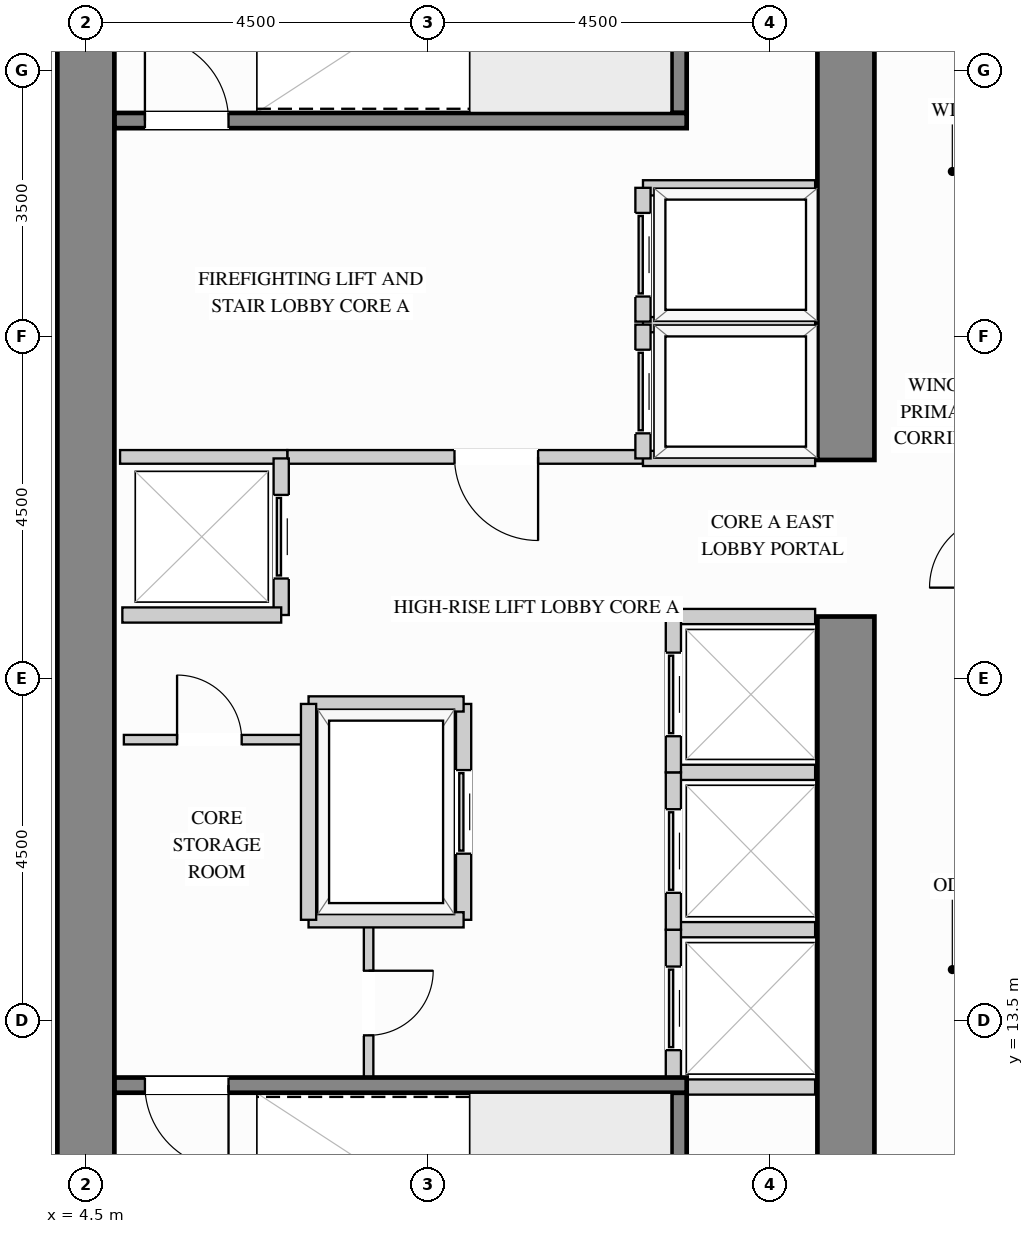
"""IFC4 building model, lengths in metres.
Left out: names, types, materials, properties, quantities, classifications, styles, units other than length and angle.
Written with IfcOpenShell. Run it as: python <this file> out.ifc"""

import sys

from ifc_helpers import new_model, si_unit, direction, frame, frame_2d, origin, place, context, subcontext, project, spatial, rectangle, extrude, source, transform, mapped, element, fill, save


model = new_model("IFC4")
c1 = context("Model", 3, precision=1e-05, world=origin(), true_north=direction((0.0, 1.0)))
c2 = subcontext(c1, "Body", "Model", "MODEL_VIEW")
j1 = project(units=[si_unit("LENGTHUNIT", "METRE"), si_unit("PLANEANGLEUNIT", "RADIAN")], contexts=[c1])
p1 = place(None, origin())
s1 = spatial("IfcSite", under=j1, at=p1, CompositionType="ELEMENT")
p2 = place(p1, origin())
s2 = spatial("IfcBuilding", under=s1, at=p2, CompositionType="ELEMENT")
p3 = place(p2, frame((0.0, 0.0, 117.0)))
s3 = spatial("IfcBuildingStorey", under=s2, at=p3, CompositionType="ELEMENT", Elevation=117.0)
m1 = source(origin(), c2, "Body", "SweptSolid", [
    extrude(rectangle(XDim=9.945, YDim=0.75, at=frame_2d((4.973, 0.0))), origin(), (0.0, 0.0, 1.0), 3.38),
])
p4 = place(p3, frame((14.5, 8.875, 0.0), z_axis=(0.0, 0.0, 1.0), x_axis=(0.0, 1.0, 0.0)))
e1 = element("IfcWall", 1, at=p4, inside=s3, PredefinedType="SHEAR", context=c2, shape_type="MappedRepresentation", body=[
    mapped(m1, transform((0.0, 0.0, 0.0), x_axis=(1.0, 0.0, 0.0), y_axis=(0.0, 1.0, 0.0), z_axis=(0.0, 0.0, 1.0))),
])
m2 = source(origin(), c2, "Body", "SweptSolid", [
    extrude(rectangle(XDim=8.245, YDim=0.75, at=frame_2d((4.123, 0.0))), origin(), (0.0, 0.0, 1.0), 3.38),
])
p5 = place(p3, frame((14.5, 20.88, 0.0), z_axis=(0.0, 0.0, 1.0), x_axis=(0.0, 1.0, 0.0)))
e2 = element("IfcWall", 2, at=p5, inside=s3, PredefinedType="SHEAR", context=c2, shape_type="MappedRepresentation", body=[
    mapped(m2, transform((0.0, 0.0, 0.0), x_axis=(1.0, 0.0, 0.0), y_axis=(0.0, 1.0, 0.0), z_axis=(0.0, 0.0, 1.0))),
])
m3 = source(origin(), c2, "Body", "SweptSolid", [
    extrude(rectangle(XDim=20.25, YDim=0.75, at=frame_2d((10.125, 0.0))), origin(), (0.0, 0.0, 1.0), 3.38),
])
p6 = place(p3, frame((4.5, 8.875, 0.0), z_axis=(0.0, 0.0, 1.0), x_axis=(0.0, 1.0, 0.0)))
e3 = element("IfcWall", 3, at=p6, inside=s3, PredefinedType="SHEAR", context=c2, shape_type="MappedRepresentation", body=[
    mapped(m3, transform((0.0, 0.0, 0.0), x_axis=(1.0, 0.0, 0.0), y_axis=(0.0, 1.0, 0.0), z_axis=(0.0, 0.0, 1.0))),
])
p7 = place(p3, frame((7.15, 20.92, 0.0), z_axis=(0.0, 0.0, 1.0), x_axis=(1.0, 0.0, 0.0)))
e4 = element("IfcWall", 4, at=p7, inside=s3, PredefinedType="PARTITIONING", context=c2, shape_type="SweptSolid", body=[
    extrude(rectangle(XDim=4.68, YDim=0.18, at=frame_2d((2.34, 0.0))), origin(), (0.0, 0.0, 1.0), 3.365),
])
p8 = place(p7, frame((2.2, 0.0, 0.0)))
e5 = element("IfcOpeningElement", 5, at=p8, cuts=e4, PredefinedType="OPENING", context=c2, shape_type="SweptSolid", body=[
    extrude(rectangle(XDim=1.1, YDim=2.15, at=frame_2d((0.55, 1.075))), frame((0.0, 0.1, 0.0), z_axis=(0.0, -1.0, 0.0), x_axis=(1.0, 0.0, 0.0)), (0.0, 0.0, 1.0), 0.2),
])
m4 = source(origin(), c2, "Body", "SweptSolid", [
    extrude(rectangle(XDim=2.2, YDim=0.18, at=frame_2d((1.1, 0.0))), origin(), (0.0, 0.0, 1.0), 3.365),
])
p9 = place(p3, frame((4.95, 20.92, 0.0), z_axis=(0.0, 0.0, 1.0), x_axis=(1.0, 0.0, 0.0)))
e6 = element("IfcWall", 6, at=p9, inside=s3, PredefinedType="PARTITIONING", context=c2, shape_type="MappedRepresentation", body=[
    mapped(m4, transform((0.0, 0.0, 0.0), x_axis=(1.0, 0.0, 0.0), y_axis=(0.0, 1.0, 0.0), z_axis=(0.0, 0.0, 1.0))),
])
p10 = place(p3, frame((8.22, 12.75, 0.0), z_axis=(0.0, 0.0, 1.0), x_axis=(0.0, 1.0, 0.0)))
e7 = element("IfcWall", 7, at=p10, inside=s3, PredefinedType="PARTITIONING", context=c2, shape_type="SweptSolid", body=[
    extrude(rectangle(XDim=2.07, YDim=0.125, at=frame_2d((1.035, 0.0))), origin(), (0.0, 0.0, 1.0), 3.365),
])
p11 = place(p10, frame((0.56, 0.0, 0.0)))
e8 = element("IfcOpeningElement", 8, at=p11, cuts=e7, PredefinedType="OPENING", context=c2, shape_type="SweptSolid", body=[
    extrude(rectangle(XDim=0.85, YDim=2.1, at=frame_2d((0.425, 1.05))), frame((0.0, 0.073, 0.0), z_axis=(0.0, -1.0, 0.0), x_axis=(1.0, 0.0, 0.0)), (0.0, 0.0, 1.0), 0.145),
])
p12 = place(p3, frame((5.0, 17.2, 0.0), z_axis=(0.0, 0.0, 1.0), x_axis=(1.0, 0.0, 0.0)))
e9 = element("IfcWall", 9, at=p12, inside=s3, PredefinedType="PARTITIONING", context=c2, shape_type="SweptSolid", body=[
    extrude(rectangle(XDim=2.4, YDim=0.125, at=frame_2d((1.2, 0.0))), origin(), (0.0, 0.0, 1.0), 3.365),
])
p13 = place(p12, frame((0.7, 0.0, 0.0)))
e10 = element("IfcOpeningElement", 10, at=p13, cuts=e9, PredefinedType="OPENING", context=c2, shape_type="SweptSolid", body=[
    extrude(rectangle(XDim=0.85, YDim=2.1, at=frame_2d((0.425, 1.05))), frame((0.0, 0.073, 0.0), z_axis=(0.0, -1.0, 0.0), x_axis=(1.0, 0.0, 0.0)), (0.0, 0.0, 1.0), 0.145),
])
m5 = source(origin(), c2, "Body", "SweptSolid", [
    extrude(rectangle(XDim=2.265, YDim=0.2, at=frame_2d((1.132, 0.0))), origin(), (0.0, 0.0, 1.0), 3.365),
])
for number, where, z_axis, x_axis in (
    (11, (11.83, 22.66, 0.0), (0.0, 0.0, 1.0), (1.0, 0.0, 0.0)),
    (12, (11.83, 20.9, 0.0), (0.0, 0.0, 1.0), (1.0, 0.0, 0.0)),
):
    element("IfcWall", number, at=place(p3, frame(where, z_axis=z_axis, x_axis=x_axis)), inside=s3, PredefinedType="PARTITIONING", context=c2, shape_type="MappedRepresentation", body=[
        mapped(m5, transform((0.0, 0.0, 0.0), x_axis=(1.0, 0.0, 0.0), y_axis=(0.0, 1.0, 0.0), z_axis=(0.0, 0.0, 1.0))),
    ])
p14 = place(p3, frame((11.83, 20.9, 0.0), z_axis=(0.0, 0.0, 1.0), x_axis=(0.0, 1.0, 0.0)))
e13 = element("IfcWall", 13, at=p14, inside=s3, PredefinedType="PARTITIONING", context=c2, shape_type="SweptSolid", body=[
    extrude(rectangle(XDim=1.76, YDim=0.2, at=frame_2d((0.88, 0.0))), origin(), (0.0, 0.0, 1.0), 3.365),
])
p15 = place(p14, frame((0.33, 0.0, 0.0)))
e14 = element("IfcOpeningElement", 14, at=p15, cuts=e13, PredefinedType="OPENING", context=c2, shape_type="SweptSolid", body=[
    extrude(rectangle(XDim=1.1, YDim=2.2, at=frame_2d((0.55, 1.1))), frame((0.0, 0.11, 0.0), z_axis=(0.0, -1.0, 0.0), x_axis=(1.0, 0.0, 0.0)), (0.0, 0.0, 1.0), 0.22),
])
p16 = place(p3, frame((11.83, 24.46, 0.0), z_axis=(0.0, 0.0, 1.0), x_axis=(1.0, 0.0, 0.0)))
e15 = element("IfcWall", 15, at=p16, inside=s3, PredefinedType="PARTITIONING", context=c2, shape_type="MappedRepresentation", body=[
    mapped(m5, transform((0.0, 0.0, 0.0), x_axis=(1.0, 0.0, 0.0), y_axis=(0.0, 1.0, 0.0), z_axis=(0.0, 0.0, 1.0))),
])
p17 = place(p3, frame((11.83, 22.7, 0.0), z_axis=(0.0, 0.0, 1.0), x_axis=(0.0, 1.0, 0.0)))
e16 = element("IfcWall", 16, at=p17, inside=s3, PredefinedType="PARTITIONING", context=c2, shape_type="SweptSolid", body=[
    extrude(rectangle(XDim=1.76, YDim=0.2, at=frame_2d((0.88, 0.0))), origin(), (0.0, 0.0, 1.0), 3.365),
])
p18 = place(p17, frame((0.33, 0.0, 0.0)))
e17 = element("IfcOpeningElement", 17, at=p18, cuts=e16, PredefinedType="OPENING", context=c2, shape_type="SweptSolid", body=[
    extrude(rectangle(XDim=1.1, YDim=2.2, at=frame_2d((0.55, 1.1))), frame((0.0, 0.11, 0.0), z_axis=(0.0, -1.0, 0.0), x_axis=(1.0, 0.0, 0.0)), (0.0, 0.0, 1.0), 0.22),
])
m6 = source(origin(), c2, "Body", "SweptSolid", [
    extrude(rectangle(XDim=1.865, YDim=0.2, at=frame_2d((0.933, 0.0))), origin(), (0.0, 0.0, 1.0), 3.365),
])
for number, where, z_axis, x_axis in (
    (18, (12.23, 14.7, 0.0), (0.0, 0.0, 1.0), (1.0, 0.0, 0.0)),
    (19, (12.23, 12.63, 0.0), (0.0, 0.0, 1.0), (1.0, 0.0, 0.0)),
):
    element("IfcWall", number, at=place(p3, frame(where, z_axis=z_axis, x_axis=x_axis)), inside=s3, PredefinedType="PARTITIONING", context=c2, shape_type="MappedRepresentation", body=[
        mapped(m6, transform((0.0, 0.0, 0.0), x_axis=(1.0, 0.0, 0.0), y_axis=(0.0, 1.0, 0.0), z_axis=(0.0, 0.0, 1.0))),
    ])
p19 = place(p3, frame((12.23, 12.63, 0.0), z_axis=(0.0, 0.0, 1.0), x_axis=(0.0, 1.0, 0.0)))
e20 = element("IfcWall", 20, at=p19, inside=s3, PredefinedType="PARTITIONING", context=c2, shape_type="SweptSolid", body=[
    extrude(rectangle(XDim=2.07, YDim=0.2, at=frame_2d((1.035, 0.0))), origin(), (0.0, 0.0, 1.0), 3.365),
])
p20 = place(p19, frame((0.485, 0.0, 0.0)))
e21 = element("IfcOpeningElement", 21, at=p20, cuts=e20, PredefinedType="OPENING", context=c2, shape_type="SweptSolid", body=[
    extrude(rectangle(XDim=1.1, YDim=2.2, at=frame_2d((0.55, 1.1))), frame((0.0, 0.11, 0.0), z_axis=(0.0, -1.0, 0.0), x_axis=(1.0, 0.0, 0.0)), (0.0, 0.0, 1.0), 0.22),
])
p21 = place(p3, frame((12.23, 16.77, 0.0), z_axis=(0.0, 0.0, 1.0), x_axis=(1.0, 0.0, 0.0)))
e22 = element("IfcWall", 22, at=p21, inside=s3, PredefinedType="PARTITIONING", context=c2, shape_type="MappedRepresentation", body=[
    mapped(m6, transform((0.0, 0.0, 0.0), x_axis=(1.0, 0.0, 0.0), y_axis=(0.0, 1.0, 0.0), z_axis=(0.0, 0.0, 1.0))),
])
p22 = place(p3, frame((12.23, 14.7, 0.0), z_axis=(0.0, 0.0, 1.0), x_axis=(0.0, 1.0, 0.0)))
e23 = element("IfcWall", 23, at=p22, inside=s3, PredefinedType="PARTITIONING", context=c2, shape_type="SweptSolid", body=[
    extrude(rectangle(XDim=2.07, YDim=0.2, at=frame_2d((1.035, 0.0))), origin(), (0.0, 0.0, 1.0), 3.365),
])
p23 = place(p22, frame((0.485, 0.0, 0.0)))
e24 = element("IfcOpeningElement", 24, at=p23, cuts=e23, PredefinedType="OPENING", context=c2, shape_type="SweptSolid", body=[
    extrude(rectangle(XDim=1.1, YDim=2.2, at=frame_2d((0.55, 1.1))), frame((0.0, 0.11, 0.0), z_axis=(0.0, -1.0, 0.0), x_axis=(1.0, 0.0, 0.0)), (0.0, 0.0, 1.0), 0.22),
])
p24 = place(p3, frame((12.23, 18.82, 0.0), z_axis=(0.0, 0.0, 1.0), x_axis=(1.0, 0.0, 0.0)))
e25 = element("IfcWall", 25, at=p24, inside=s3, PredefinedType="PARTITIONING", context=c2, shape_type="MappedRepresentation", body=[
    mapped(m6, transform((0.0, 0.0, 0.0), x_axis=(1.0, 0.0, 0.0), y_axis=(0.0, 1.0, 0.0), z_axis=(0.0, 0.0, 1.0))),
])
p25 = place(p3, frame((12.23, 16.77, 0.0), z_axis=(0.0, 0.0, 1.0), x_axis=(0.0, 1.0, 0.0)))
e26 = element("IfcWall", 26, at=p25, inside=s3, PredefinedType="PARTITIONING", context=c2, shape_type="SweptSolid", body=[
    extrude(rectangle(XDim=2.05, YDim=0.2, at=frame_2d((1.025, 0.0))), origin(), (0.0, 0.0, 1.0), 3.365),
])
p26 = place(p25, frame((0.475, 0.0, 0.0)))
e27 = element("IfcOpeningElement", 27, at=p26, cuts=e26, PredefinedType="OPENING", context=c2, shape_type="SweptSolid", body=[
    extrude(rectangle(XDim=1.1, YDim=2.2, at=frame_2d((0.55, 1.1))), frame((0.0, 0.11, 0.0), z_axis=(0.0, -1.0, 0.0), x_axis=(1.0, 0.0, 0.0)), (0.0, 0.0, 1.0), 0.22),
])
p27 = place(p3, frame((7.07, 18.84, 0.0), z_axis=(0.0, 0.0, 1.0), x_axis=(0.0, 1.0, 0.0)))
e28 = element("IfcWall", 28, at=p27, inside=s3, PredefinedType="PARTITIONING", context=c2, shape_type="SweptSolid", body=[
    extrude(rectangle(XDim=2.06, YDim=0.2, at=frame_2d((1.03, 0.0))), origin(), (0.0, 0.0, 1.0), 3.365),
])
p28 = place(p27, frame((0.48, 0.0, 0.0)))
e29 = element("IfcOpeningElement", 29, at=p28, cuts=e28, PredefinedType="OPENING", context=c2, shape_type="SweptSolid", body=[
    extrude(rectangle(XDim=1.1, YDim=2.2, at=frame_2d((0.55, 1.1))), frame((0.0, 0.11, 0.0), z_axis=(0.0, -1.0, 0.0), x_axis=(1.0, 0.0, 0.0)), (0.0, 0.0, 1.0), 0.22),
])
m7 = source(origin(), c2, "Body", "SweptSolid", [
    extrude(rectangle(XDim=2.09, YDim=0.2, at=frame_2d((1.045, 0.0))), origin(), (0.0, 0.0, 1.0), 3.365),
])
p29 = place(p3, frame((4.98, 18.84, 0.0), z_axis=(0.0, 0.0, 1.0), x_axis=(1.0, 0.0, 0.0)))
e30 = element("IfcWall", 30, at=p29, inside=s3, PredefinedType="PARTITIONING", context=c2, shape_type="MappedRepresentation", body=[
    mapped(m7, transform((0.0, 0.0, 0.0), x_axis=(1.0, 0.0, 0.0), y_axis=(0.0, 1.0, 0.0), z_axis=(0.0, 0.0, 1.0))),
])
p30 = place(p3, frame((9.47, 14.83, 0.0), z_axis=(0.0, 0.0, 1.0), x_axis=(0.0, 1.0, 0.0)))
e31 = element("IfcWall", 31, at=p30, inside=s3, PredefinedType="PARTITIONING", context=c2, shape_type="SweptSolid", body=[
    extrude(rectangle(XDim=2.84, YDim=0.2, at=frame_2d((1.42, 0.0))), origin(), (0.0, 0.0, 1.0), 3.365),
])
p31 = place(p30, frame((0.87, 0.0, 0.0)))
e32 = element("IfcOpeningElement", 32, at=p31, cuts=e31, PredefinedType="OPENING", context=c2, shape_type="SweptSolid", body=[
    extrude(rectangle(XDim=1.1, YDim=2.2, at=frame_2d((0.55, 1.1))), frame((0.0, 0.11, 0.0), z_axis=(0.0, -1.0, 0.0), x_axis=(1.0, 0.0, 0.0)), (0.0, 0.0, 1.0), 0.22),
])
m8 = source(origin(), c2, "Body", "SweptSolid", [
    extrude(rectangle(XDim=2.04, YDim=0.2, at=frame_2d((1.02, 0.0))), origin(), (0.0, 0.0, 1.0), 3.365),
])
for number, where, z_axis, x_axis in (
    (33, (7.43, 17.67, 0.0), (0.0, 0.0, 1.0), (1.0, 0.0, 0.0)),
    (34, (7.43, 14.83, 0.0), (0.0, 0.0, 1.0), (1.0, 0.0, 0.0)),
):
    element("IfcWall", number, at=place(p3, frame(where, z_axis=z_axis, x_axis=x_axis)), inside=s3, PredefinedType="PARTITIONING", context=c2, shape_type="MappedRepresentation", body=[
        mapped(m8, transform((0.0, 0.0, 0.0), x_axis=(1.0, 0.0, 0.0), y_axis=(0.0, 1.0, 0.0), z_axis=(0.0, 0.0, 1.0))),
    ])
m9 = source(origin(), c2, "Body", "SweptSolid", [
    extrude(rectangle(XDim=2.84, YDim=0.2, at=frame_2d((1.42, 0.0))), origin(), (0.0, 0.0, 1.0), 3.365),
])
p32 = place(p3, frame((7.43, 14.83, 0.0), z_axis=(0.0, 0.0, 1.0), x_axis=(0.0, 1.0, 0.0)))
e35 = element("IfcWall", 35, at=p32, inside=s3, PredefinedType="PARTITIONING", context=c2, shape_type="MappedRepresentation", body=[
    mapped(m9, transform((0.0, 0.0, 0.0), x_axis=(1.0, 0.0, 0.0), y_axis=(0.0, 1.0, 0.0), z_axis=(0.0, 0.0, 1.0))),
])
m10 = source(origin(), c2, "Body", "SweptSolid", [
    extrude(rectangle(XDim=3.678, YDim=0.2, at=frame_2d((1.839, 0.0))), origin(), (0.0, 0.0, 1.0), 3.38),
])
p33 = place(p3, frame((12.305, 8.877, 0.0), z_axis=(0.0, 0.0, 1.0), x_axis=(0.0, 1.0, 0.0)))
e36 = element("IfcWall", 36, at=p33, inside=s3, PredefinedType="SHEAR", context=c2, shape_type="MappedRepresentation", body=[
    mapped(m10, transform((0.0, 0.0, 0.0), x_axis=(1.0, 0.0, 0.0), y_axis=(0.0, 1.0, 0.0), z_axis=(0.0, 0.0, 1.0))),
])
p34 = place(p3, frame((4.877, 12.655, 0.0), z_axis=(0.0, 0.0, 1.0), x_axis=(1.0, 0.0, 0.0)))
e37 = element("IfcWall", 37, at=p34, inside=s3, PredefinedType="SHEAR", context=c2, shape_type="SweptSolid", body=[
    extrude(rectangle(XDim=7.528, YDim=0.2, at=frame_2d((3.764, 0.0))), origin(), (0.0, 0.0, 1.0), 3.38),
])
p35 = place(p34, frame((0.4, 0.0, 0.0)))
e38 = element("IfcOpeningElement", 38, at=p35, cuts=e37, PredefinedType="OPENING", context=c2, shape_type="SweptSolid", body=[
    extrude(rectangle(XDim=1.1, YDim=2.15, at=frame_2d((0.55, 1.075))), frame((0.0, 0.11, 0.0), z_axis=(0.0, -1.0, 0.0), x_axis=(1.0, 0.0, 0.0)), (0.0, 0.0, 1.0), 0.22),
])
p36 = place(p3, frame((12.305, 25.445, 0.0), z_axis=(0.0, 0.0, 1.0), x_axis=(0.0, 1.0, 0.0)))
e39 = element("IfcWall", 39, at=p36, inside=s3, PredefinedType="SHEAR", context=c2, shape_type="MappedRepresentation", body=[
    mapped(m10, transform((0.0, 0.0, 0.0), x_axis=(1.0, 0.0, 0.0), y_axis=(0.0, 1.0, 0.0), z_axis=(0.0, 0.0, 1.0))),
])
p37 = place(p3, frame((4.877, 25.345, 0.0), z_axis=(0.0, 0.0, 1.0), x_axis=(1.0, 0.0, 0.0)))
e40 = element("IfcWall", 40, at=p37, inside=s3, PredefinedType="SHEAR", context=c2, shape_type="SweptSolid", body=[
    extrude(rectangle(XDim=7.528, YDim=0.2, at=frame_2d((3.764, 0.0))), origin(), (0.0, 0.0, 1.0), 3.38),
])
p38 = place(p37, frame((0.4, 0.0, 0.0)))
e41 = element("IfcOpeningElement", 41, at=p38, cuts=e40, PredefinedType="OPENING", context=c2, shape_type="SweptSolid", body=[
    extrude(rectangle(XDim=1.1, YDim=2.15, at=frame_2d((0.55, 1.075))), frame((0.0, 0.11, 0.0), z_axis=(0.0, -1.0, 0.0), x_axis=(1.0, 0.0, 0.0)), (0.0, 0.0, 1.0), 0.22),
])
m11 = source(origin(), c2, "Body", "SweptSolid", [
    extrude(rectangle(XDim=1.1, YDim=2.15, at=frame_2d((0.55, 1.075))), frame((0.0, 0.025, 0.0), z_axis=(0.0, -1.0, 0.0), x_axis=(1.0, 0.0, 0.0)), (0.0, 0.0, 1.0), 0.05),
])
p39 = place(p8, origin())
e42 = element("IfcDoor", 42, at=p39, inside=s3, OperationType="SINGLE_SWING_RIGHT", PredefinedType="DOOR", context=c2, shape_type="MappedRepresentation", body=[
    mapped(m11, transform((0.0, 0.0, 0.0), x_axis=(1.0, 0.0, 0.0), y_axis=(0.0, 1.0, 0.0), z_axis=(0.0, 0.0, 1.0))),
])
fill(e5, e42)
m12 = source(origin(), c2, "Body", "SweptSolid", [
    extrude(rectangle(XDim=1.1, YDim=2.2, at=frame_2d((0.55, 1.1))), frame((0.0, 0.025, 0.0), z_axis=(0.0, -1.0, 0.0), x_axis=(1.0, 0.0, 0.0)), (0.0, 0.0, 1.0), 0.05),
])
p40 = place(p15, origin())
e43 = element("IfcDoor", 43, at=p40, inside=s3, OperationType="SLIDING_TO_LEFT", PredefinedType="DOOR", context=c2, shape_type="MappedRepresentation", body=[
    mapped(m12, transform((0.0, 0.0, 0.0), x_axis=(1.0, 0.0, 0.0), y_axis=(0.0, 1.0, 0.0), z_axis=(0.0, 0.0, 1.0))),
])
fill(e14, e43)
p41 = place(p18, origin())
e44 = element("IfcDoor", 44, at=p41, inside=s3, OperationType="SLIDING_TO_LEFT", PredefinedType="DOOR", context=c2, shape_type="MappedRepresentation", body=[
    mapped(m12, transform((0.0, 0.0, 0.0), x_axis=(1.0, 0.0, 0.0), y_axis=(0.0, 1.0, 0.0), z_axis=(0.0, 0.0, 1.0))),
])
fill(e17, e44)
p42 = place(p20, origin())
e45 = element("IfcDoor", 45, at=p42, inside=s3, OperationType="SLIDING_TO_LEFT", PredefinedType="DOOR", context=c2, shape_type="MappedRepresentation", body=[
    mapped(m12, transform((0.0, 0.0, 0.0), x_axis=(1.0, 0.0, 0.0), y_axis=(0.0, 1.0, 0.0), z_axis=(0.0, 0.0, 1.0))),
])
fill(e21, e45)
p43 = place(p23, origin())
e46 = element("IfcDoor", 46, at=p43, inside=s3, OperationType="SLIDING_TO_LEFT", PredefinedType="DOOR", context=c2, shape_type="MappedRepresentation", body=[
    mapped(m12, transform((0.0, 0.0, 0.0), x_axis=(1.0, 0.0, 0.0), y_axis=(0.0, 1.0, 0.0), z_axis=(0.0, 0.0, 1.0))),
])
fill(e24, e46)
p44 = place(p26, origin())
e47 = element("IfcDoor", 47, at=p44, inside=s3, OperationType="SLIDING_TO_LEFT", PredefinedType="DOOR", context=c2, shape_type="MappedRepresentation", body=[
    mapped(m12, transform((0.0, 0.0, 0.0), x_axis=(1.0, 0.0, 0.0), y_axis=(0.0, 1.0, 0.0), z_axis=(0.0, 0.0, 1.0))),
])
fill(e27, e47)
p45 = place(p28, origin())
e48 = element("IfcDoor", 48, at=p45, inside=s3, OperationType="SLIDING_TO_LEFT", PredefinedType="DOOR", context=c2, shape_type="MappedRepresentation", body=[
    mapped(m12, transform((0.0, 0.0, 0.0), x_axis=(1.0, 0.0, 0.0), y_axis=(0.0, 1.0, 0.0), z_axis=(0.0, 0.0, 1.0))),
])
fill(e29, e48)
p46 = place(p31, origin())
e49 = element("IfcDoor", 49, at=p46, inside=s3, OperationType="SLIDING_TO_LEFT", PredefinedType="DOOR", context=c2, shape_type="MappedRepresentation", body=[
    mapped(m12, transform((0.0, 0.0, 0.0), x_axis=(1.0, 0.0, 0.0), y_axis=(0.0, 1.0, 0.0), z_axis=(0.0, 0.0, 1.0))),
])
fill(e32, e49)
m13 = source(origin(), c2, "Body", "SweptSolid", [
    extrude(rectangle(XDim=0.85, YDim=2.1, at=frame_2d((0.425, 1.05))), frame((0.0, 0.025, 0.0), z_axis=(0.0, -1.0, 0.0), x_axis=(1.0, 0.0, 0.0)), (0.0, 0.0, 1.0), 0.05),
])
p47 = place(p13, origin())
e50 = element("IfcDoor", 50, at=p47, inside=s3, OperationType="SINGLE_SWING_LEFT", PredefinedType="DOOR", context=c2, shape_type="MappedRepresentation", body=[
    mapped(m13, transform((0.0, 0.0, 0.0), x_axis=(1.0, 0.0, 0.0), y_axis=(0.0, 1.0, 0.0), z_axis=(0.0, 0.0, 1.0))),
])
fill(e10, e50)
p48 = place(p11, origin())
e51 = element("IfcDoor", 51, at=p48, inside=s3, OperationType="SINGLE_SWING_RIGHT", PredefinedType="DOOR", context=c2, shape_type="MappedRepresentation", body=[
    mapped(m13, transform((0.0, 0.0, 0.0), x_axis=(1.0, 0.0, 0.0), y_axis=(0.0, 1.0, 0.0), z_axis=(0.0, 0.0, 1.0))),
])
fill(e8, e51)
m14 = source(origin(), c2, "Body", "SweptSolid", [
    extrude(rectangle(XDim=1.1, YDim=2.15, at=frame_2d((0.55, 1.075))), frame((0.0, 0.025, 0.0), z_axis=(0.0, -1.0, 0.0), x_axis=(1.0, 0.0, 0.0)), (0.0, 0.0, 1.0), 0.05),
])
p49 = place(p35, origin())
e52 = element("IfcDoor", 52, at=p49, inside=s3, OperationType="SINGLE_SWING_RIGHT", PredefinedType="DOOR", context=c2, shape_type="MappedRepresentation", body=[
    mapped(m14, transform((0.0, 0.0, 0.0), x_axis=(1.0, 0.0, 0.0), y_axis=(0.0, 1.0, 0.0), z_axis=(0.0, 0.0, 1.0))),
])
fill(e38, e52)
p50 = place(p38, origin())
e53 = element("IfcDoor", 53, at=p50, inside=s3, OperationType="SINGLE_SWING_LEFT", PredefinedType="DOOR", context=c2, shape_type="MappedRepresentation", body=[
    mapped(m14, transform((0.0, 0.0, 0.0), x_axis=(1.0, 0.0, 0.0), y_axis=(0.0, 1.0, 0.0), z_axis=(0.0, 0.0, 1.0))),
])
fill(e41, e53)
save(model, sys.argv[1])
